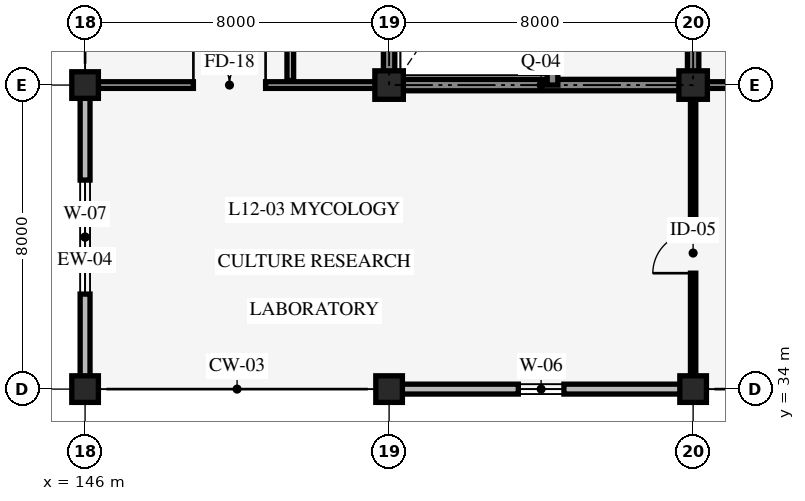
"""IFC4 building model, lengths in metres.
Left out: names, types, materials, properties, quantities, classifications, styles, units other than length and angle.
Written with IfcOpenShell. Run it as: python <this file> out.ifc"""

import sys

from ifc_helpers import new_model, si_unit, direction, frame, frame_2d, origin, origin_2d, place, context, subcontext, project, spatial, rectangle, extrude, element, fill, save


model = new_model("IFC4")
c1 = context("Model", 3, precision=1e-05, world=origin(), true_north=direction((0.0, 1.0)))
c2 = subcontext(c1, "Body", "Model", "MODEL_VIEW")
j1 = project(units=[si_unit("LENGTHUNIT", "METRE"), si_unit("PLANEANGLEUNIT", "RADIAN")], contexts=[c1])
p1 = place(None, origin())
s1 = spatial("IfcSite", under=j1, at=p1, CompositionType="ELEMENT")
p2 = place(p1, origin())
s2 = spatial("IfcBuilding", under=s1, at=p2, CompositionType="ELEMENT")
p3 = place(p2, frame((0.0, 0.0, 48.6)))
s3 = spatial("IfcBuildingStorey", under=s2, at=p3, CompositionType="ELEMENT", Elevation=48.6)
p4 = place(p3, frame((154.0, 42.0, 0.0), z_axis=(0.0, 0.0, 1.0), x_axis=(1.0, 0.0, 0.0)))
e1 = element("IfcWall", 1, at=p4, inside=s3, PredefinedType="SHEAR", context=c2, shape_type="SweptSolid", body=[
    extrude(rectangle(XDim=8.0, YDim=0.3, at=frame_2d((4.0, 0.0))), origin(), (0.0, 0.0, 1.0), 3.95),
])
p5 = place(p3, frame((162.0, 42.0, 0.0), z_axis=(0.0, 0.0, 1.0), x_axis=(0.0, 1.0, 0.0)))
e2 = element("IfcWall", 2, at=p5, inside=s3, PredefinedType="SHEAR", context=c2, shape_type="SweptSolid", body=[
    extrude(rectangle(XDim=8.0, YDim=0.3, at=frame_2d((4.0, 0.0))), origin(), (0.0, 0.0, 1.0), 3.95),
])
p6 = place(p5, frame((3.175, 0.0, 0.0)))
e3 = element("IfcOpeningElement", 3, at=p6, cuts=e2, PredefinedType="OPENING", context=c2, shape_type="SweptSolid", body=[
    extrude(rectangle(XDim=1.05, YDim=2.2, at=frame_2d((0.525, 1.1))), frame((0.0, 0.16, 0.0), z_axis=(0.0, -1.0, 0.0), x_axis=(1.0, 0.0, 0.0)), (0.0, 0.0, 1.0), 0.32),
])
p7 = place(p3, frame((154.0, 50.0, 0.0), z_axis=(0.0, 0.0, 1.0), x_axis=(0.0, -1.0, 0.0)))
e4 = element("IfcWall", 4, at=p7, inside=s3, PredefinedType="SHEAR", context=c2, shape_type="SweptSolid", body=[
    extrude(rectangle(XDim=8.0, YDim=0.3, at=frame_2d((4.0, 0.0))), origin(), (0.0, 0.0, 1.0), 3.95),
])
p8 = place(p3, frame((158.3, 42.0, 0.0), z_axis=(0.0, 0.0, 1.0), x_axis=(0.0, 1.0, 0.0)))
e5 = element("IfcWall", 5, at=p8, inside=s3, PredefinedType="SHEAR", context=c2, shape_type="SweptSolid", body=[
    extrude(rectangle(XDim=8.0, YDim=0.28, at=frame_2d((4.0, 0.0))), origin(), (0.0, 0.0, 1.0), 3.95),
])
for number, where, z_axis, x_axis in (
    (6, (146.0, 34.0, 0.0), (0.0, 0.0, 1.0), (1.0, 0.0, 0.0)),
    (7, (146.0, 42.0, 0.0), (0.0, 0.0, 1.0), (1.0, 0.0, 0.0)),
    (8, (154.0, 34.0, 0.0), (0.0, 0.0, 1.0), (1.0, 0.0, 0.0)),
):
    element("IfcColumn", number, at=place(p3, frame(where, z_axis=z_axis, x_axis=x_axis)), inside=s3, PredefinedType="COLUMN", context=c2, shape_type="SweptSolid", body=[
        extrude(rectangle(XDim=0.7, YDim=0.7, at=origin_2d()), origin(), (0.0, 0.0, 1.0), 4.2),
    ])
p9 = place(p3, frame((154.0, 42.0, 0.0), z_axis=(0.0, 0.0, 1.0), x_axis=(1.0, 0.0, 0.0)))
e9 = element("IfcColumn", 9, at=p9, inside=s3, PredefinedType="COLUMN", context=c2, shape_type="SweptSolid", body=[
    extrude(rectangle(XDim=0.75, YDim=0.75, at=origin_2d()), origin(), (0.0, 0.0, 1.0), 4.2),
])
p10 = place(p3, frame((162.0, 34.0, 0.0), z_axis=(0.0, 0.0, 1.0), x_axis=(1.0, 0.0, 0.0)))
e10 = element("IfcColumn", 10, at=p10, inside=s3, PredefinedType="COLUMN", context=c2, shape_type="SweptSolid", body=[
    extrude(rectangle(XDim=0.7, YDim=0.7, at=origin_2d()), origin(), (0.0, 0.0, 1.0), 4.2),
])
p11 = place(p3, frame((162.0, 42.0, 0.0), z_axis=(0.0, 0.0, 1.0), x_axis=(1.0, 0.0, 0.0)))
e11 = element("IfcColumn", 11, at=p11, inside=s3, PredefinedType="COLUMN", context=c2, shape_type="SweptSolid", body=[
    extrude(rectangle(XDim=0.75, YDim=0.75, at=origin_2d()), origin(), (0.0, 0.0, 1.0), 4.2),
])
p12 = place(p3, frame((162.0, 34.0, 0.0), z_axis=(0.0, 0.0, 1.0), x_axis=(-1.0, 0.0, 0.0)))
e12 = element("IfcWall", 12, at=p12, inside=s3, PredefinedType="STANDARD", context=c2, shape_type="SweptSolid", body=[
    extrude(rectangle(XDim=8.0, YDim=0.26, at=frame_2d((4.0, 0.0))), origin(), (0.0, 0.0, 1.0), 3.19),
])
p13 = place(p12, frame((3.4, 0.0, 0.85)))
e13 = element("IfcOpeningElement", 13, at=p13, cuts=e12, PredefinedType="OPENING", context=c2, shape_type="SweptSolid", body=[
    extrude(rectangle(XDim=1.2, YDim=1.2, at=frame_2d((0.6, 0.6))), frame((0.0, 0.14, 0.0), z_axis=(0.0, -1.0, 0.0), x_axis=(1.0, 0.0, 0.0)), (0.0, 0.0, 1.0), 0.28),
])
p14 = place(p3, frame((146.0, 34.0, 0.0), z_axis=(0.0, 0.0, 1.0), x_axis=(0.0, 1.0, 0.0)))
e14 = element("IfcWall", 14, at=p14, inside=s3, PredefinedType="STANDARD", context=c2, shape_type="SweptSolid", body=[
    extrude(rectangle(XDim=8.0, YDim=0.26, at=frame_2d((4.0, 0.0))), origin(), (0.0, 0.0, 1.0), 3.24),
])
p15 = place(p14, frame((2.5, 0.0, 0.85)))
e15 = element("IfcOpeningElement", 15, at=p15, cuts=e14, PredefinedType="OPENING", context=c2, shape_type="SweptSolid", body=[
    extrude(rectangle(XDim=3.0, YDim=1.8, at=frame_2d((1.5, 0.9))), frame((0.0, 0.14, 0.0), z_axis=(0.0, -1.0, 0.0), x_axis=(1.0, 0.0, 0.0)), (0.0, 0.0, 1.0), 0.28),
])
p16 = place(p3, frame((151.4, 42.12, 0.0), z_axis=(0.0, 0.0, 1.0), x_axis=(0.0, 1.0, 0.0)))
e16 = element("IfcWall", 16, at=p16, inside=s3, PredefinedType="STANDARD", context=c2, shape_type="SweptSolid", body=[
    extrude(rectangle(XDim=7.76, YDim=0.175, at=frame_2d((3.88, 0.0))), origin(), (0.0, 0.0, 1.0), 3.9),
])
p17 = place(p16, frame((3.105, 0.0, 0.0)))
e17 = element("IfcOpeningElement", 17, at=p17, cuts=e16, PredefinedType="OPENING", context=c2, shape_type="SweptSolid", body=[
    extrude(rectangle(XDim=1.55, YDim=2.25, at=frame_2d((0.775, 1.125))), frame((0.0, 0.098, 0.0), z_axis=(0.0, -1.0, 0.0), x_axis=(1.0, 0.0, 0.0)), (0.0, 0.0, 1.0), 0.195),
])
p18 = place(p3, frame((146.35, 42.0, 0.0), z_axis=(0.0, 0.0, 1.0), x_axis=(1.0, 0.0, 0.0)))
e18 = element("IfcWall", 18, at=p18, inside=s3, PredefinedType="STANDARD", context=c2, shape_type="SweptSolid", body=[
    extrude(rectangle(XDim=7.3, YDim=0.175, at=frame_2d((3.65, 0.0))), origin(), (0.0, 0.0, 1.0), 3.19),
])
p19 = place(p18, frame((2.5, 0.0, 0.0)))
e19 = element("IfcOpeningElement", 19, at=p19, cuts=e18, PredefinedType="OPENING", context=c2, shape_type="SweptSolid", body=[
    extrude(rectangle(XDim=1.9, YDim=2.35, at=frame_2d((0.95, 1.175))), frame((0.0, 0.098, 0.0), z_axis=(0.0, -1.0, 0.0), x_axis=(1.0, 0.0, 0.0)), (0.0, 0.0, 1.0), 0.195),
])
p20 = place(p3, frame((162.0, 34.05, 0.0), z_axis=(0.0, 0.0, 1.0), x_axis=(0.0, 1.0, 0.0)))
e20 = element("IfcWall", 20, at=p20, inside=s3, PredefinedType="STANDARD", context=c2, shape_type="SweptSolid", body=[
    extrude(rectangle(XDim=7.83, YDim=0.14, at=frame_2d((3.915, 0.0))), origin(), (0.0, 0.0, 1.0), 3.24),
])
p21 = place(p20, frame((3.0, 0.0, 0.0)))
e21 = element("IfcOpeningElement", 21, at=p21, cuts=e20, PredefinedType="OPENING", context=c2, shape_type="SweptSolid", body=[
    extrude(rectangle(XDim=1.06, YDim=2.12, at=frame_2d((0.53, 1.06))), frame((0.0, 0.08, 0.0), z_axis=(0.0, -1.0, 0.0), x_axis=(1.0, 0.0, 0.0)), (0.0, 0.0, 1.0), 0.16),
])
p22 = place(p3, frame((162.35, 42.0, 0.0), z_axis=(0.0, 0.0, 1.0), x_axis=(1.0, 0.0, 0.0)))
e22 = element("IfcWall", 22, at=p22, inside=s3, PredefinedType="STANDARD", context=c2, shape_type="SweptSolid", body=[
    extrude(rectangle(XDim=14.7, YDim=0.175, at=frame_2d((7.35, 0.0))), origin(), (0.0, 0.0, 1.0), 3.19),
])
p23 = place(p22, frame((2.75, 0.0, 0.0)))
e23 = element("IfcOpeningElement", 23, at=p23, cuts=e22, PredefinedType="OPENING", context=c2, shape_type="SweptSolid", body=[
    extrude(rectangle(XDim=0.9, YDim=2.1, at=frame_2d((0.45, 1.05))), frame((0.0, 0.098, 0.0), z_axis=(0.0, -1.0, 0.0), x_axis=(1.0, 0.0, 0.0)), (0.0, 0.0, 1.0), 0.195),
])
p24 = place(p13, origin())
e24 = element("IfcWindow", 24, at=p24, inside=s3, PartitioningType="SINGLE_PANEL", PredefinedType="WINDOW", context=c2, shape_type="SweptSolid", body=[
    extrude(rectangle(XDim=1.2, YDim=1.2, at=frame_2d((0.6, 0.6))), frame((0.0, 0.03, 0.0), z_axis=(0.0, -1.0, 0.0), x_axis=(1.0, 0.0, 0.0)), (0.0, 0.0, 1.0), 0.06),
])
fill(e13, e24)
p25 = place(p15, origin())
e25 = element("IfcWindow", 25, at=p25, inside=s3, PartitioningType="SINGLE_PANEL", PredefinedType="WINDOW", context=c2, shape_type="SweptSolid", body=[
    extrude(rectangle(XDim=3.0, YDim=1.8, at=frame_2d((1.5, 0.9))), frame((0.0, 0.03, 0.0), z_axis=(0.0, -1.0, 0.0), x_axis=(1.0, 0.0, 0.0)), (0.0, 0.0, 1.0), 0.06),
])
fill(e15, e25)
p26 = place(p19, origin())
e26 = element("IfcDoor", 26, at=p26, inside=s3, OperationType="DOUBLE_DOOR_SINGLE_SWING", PredefinedType="DOOR", context=c2, shape_type="SweptSolid", body=[
    extrude(rectangle(XDim=1.9, YDim=2.35, at=frame_2d((0.95, 1.175))), frame((0.0, 0.025, 0.0), z_axis=(0.0, -1.0, 0.0), x_axis=(1.0, 0.0, 0.0)), (0.0, 0.0, 1.0), 0.05),
])
fill(e19, e26)
p27 = place(p21, origin())
e27 = element("IfcDoor", 27, at=p27, inside=s3, OperationType="SINGLE_SWING_LEFT", PredefinedType="DOOR", context=c2, shape_type="SweptSolid", body=[
    extrude(rectangle(XDim=1.06, YDim=2.12, at=frame_2d((0.53, 1.06))), frame((0.0, 0.025, 0.0), z_axis=(0.0, -1.0, 0.0), x_axis=(1.0, 0.0, 0.0)), (0.0, 0.0, 1.0), 0.05),
])
fill(e21, e27)
save(model, sys.argv[1])
